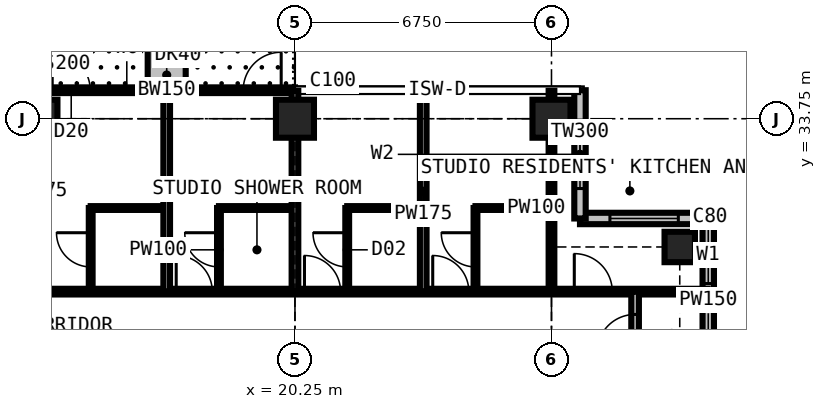
"""IFC4 building model, lengths in metres.
Left out: names, types, materials, properties, quantities, classifications, styles, units other than length and angle.
Written with IfcOpenShell. Run it as: python <this file> out.ifc"""

import sys

from ifc_helpers import new_model, si_unit, direction, frame, frame_2d, origin, origin_2d, place, context, subcontext, project, spatial, rectangle, extrude, element, fill, save


model = new_model("IFC4")
c1 = context("Model", 3, precision=1e-05, world=origin(), true_north=direction((0.0, 1.0)))
c2 = subcontext(c1, "Body", "Model", "MODEL_VIEW")
j1 = project(units=[si_unit("LENGTHUNIT", "METRE"), si_unit("PLANEANGLEUNIT", "RADIAN")], contexts=[c1])
p1 = place(None, origin())
s1 = spatial("IfcSite", under=j1, at=p1, CompositionType="ELEMENT")
p2 = place(p1, origin())
s2 = spatial("IfcBuilding", under=s1, at=p2, CompositionType="ELEMENT")
p3 = place(p2, frame((0.0, 0.0, 233.1)))
s3 = spatial("IfcBuildingStorey", under=s2, at=p3, CompositionType="ELEMENT", Elevation=233.1)
for number, where, z_axis, x_axis in (
    (1, (13.5, 33.75, 0.0), (0.0, 0.0, 1.0), (1.0, 0.0, 0.0)),
    (2, (20.25, 33.75, 0.0), (0.0, 0.0, 1.0), (1.0, 0.0, 0.0)),
    (3, (27.0, 33.75, 0.0), (0.0, 0.0, 1.0), (1.0, 0.0, 0.0)),
):
    element("IfcColumn", number, at=place(p3, frame(where, z_axis=z_axis, x_axis=x_axis)), inside=s3, PredefinedType="COLUMN", context=c2, shape_type="SweptSolid", body=[
        extrude(rectangle(XDim=1.0, YDim=1.0, at=origin_2d()), origin(), (0.0, 0.0, 1.0), 3.6),
    ])
p4 = place(p3, frame((30.375, 30.375, 0.0), z_axis=(0.0, 0.0, 1.0), x_axis=(1.0, 0.0, 0.0)))
e4 = element("IfcColumn", 4, at=p4, inside=s3, PredefinedType="COLUMN", context=c2, shape_type="SweptSolid", body=[
    extrude(rectangle(XDim=0.8, YDim=0.8, at=origin_2d()), origin(), (0.0, 0.0, 1.0), 3.6),
])
p5 = place(p3, frame((31.125, 27.75, 0.0), z_axis=(0.0, 0.0, 1.0), x_axis=(0.0, 1.0, 0.0)))
e5 = element("IfcWall", 5, at=p5, inside=s3, PredefinedType="SOLIDWALL", context=c2, shape_type="SweptSolid", body=[
    extrude(rectangle(XDim=3.375, YDim=0.3, at=frame_2d((1.688, 0.0))), origin(), (0.0, 0.0, 1.0), 3.375),
])
p6 = place(p5, frame((1.663, 0.0, 0.9)))
e6 = element("IfcOpeningElement", 6, at=p6, cuts=e5, PredefinedType="OPENING", context=c2, shape_type="SweptSolid", body=[
    extrude(rectangle(XDim=1.5, YDim=1.8, at=frame_2d((0.75, 0.9))), frame((0.0, 0.16, 0.0), z_axis=(0.0, -1.0, 0.0), x_axis=(1.0, 0.0, 0.0)), (0.0, 0.0, 1.0), 0.32),
])
p7 = place(p3, frame((31.125, 31.125, 0.0), z_axis=(0.0, 0.0, 1.0), x_axis=(-1.0, 0.0, 0.0)))
e7 = element("IfcWall", 7, at=p7, inside=s3, PredefinedType="SOLIDWALL", context=c2, shape_type="SweptSolid", body=[
    extrude(rectangle(XDim=3.375, YDim=0.3, at=frame_2d((1.688, 0.0))), origin(), (0.0, 0.0, 1.0), 3.375),
])
p8 = place(p7, frame((0.788, 0.0, 0.6)))
e8 = element("IfcOpeningElement", 8, at=p8, cuts=e7, PredefinedType="OPENING", context=c2, shape_type="SweptSolid", body=[
    extrude(rectangle(XDim=1.8, YDim=2.1, at=frame_2d((0.9, 1.05))), frame((0.0, 0.16, 0.0), z_axis=(0.0, -1.0, 0.0), x_axis=(1.0, 0.0, 0.0)), (0.0, 0.0, 1.0), 0.32),
])
p9 = place(p3, frame((27.75, 31.125, 0.0), z_axis=(0.0, 0.0, 1.0), x_axis=(0.0, 1.0, 0.0)))
e9 = element("IfcWall", 9, at=p9, inside=s3, PredefinedType="SOLIDWALL", context=c2, shape_type="SweptSolid", body=[
    extrude(rectangle(XDim=3.375, YDim=0.3, at=frame_2d((1.688, 0.0))), origin(), (0.0, 0.0, 1.0), 3.375),
])
p10 = place(p9, frame((0.788, 0.0, 0.6)))
e10 = element("IfcOpeningElement", 10, at=p10, cuts=e9, PredefinedType="OPENING", context=c2, shape_type="SweptSolid", body=[
    extrude(rectangle(XDim=1.8, YDim=2.1, at=frame_2d((0.9, 1.05))), frame((0.0, 0.16, 0.0), z_axis=(0.0, -1.0, 0.0), x_axis=(1.0, 0.0, 0.0)), (0.0, 0.0, 1.0), 0.32),
])
p11 = place(p3, frame((13.5, 34.5, 0.0), z_axis=(0.0, 0.0, 1.0), x_axis=(1.0, 0.0, 0.0)))
e11 = element("IfcWall", 11, at=p11, inside=s3, PredefinedType="SOLIDWALL", context=c2, shape_type="SweptSolid", body=[
    extrude(rectangle(XDim=6.75, YDim=0.15, at=frame_2d((3.375, 0.0))), origin(), (0.0, 0.0, 1.0), 3.375),
])
p12 = place(p11, frame((0.363, 0.0, 0.0)))
e12 = element("IfcOpeningElement", 12, at=p12, cuts=e11, PredefinedType="OPENING", context=c2, shape_type="SweptSolid", body=[
    extrude(rectangle(XDim=1.0, YDim=2.2, at=frame_2d((0.5, 1.1))), frame((0.0, 0.085, 0.0), z_axis=(0.0, -1.0, 0.0), x_axis=(1.0, 0.0, 0.0)), (0.0, 0.0, 1.0), 0.17),
])
p13 = place(p11, frame((1.725, 0.0, 0.9)))
e13 = element("IfcOpeningElement", 13, at=p13, cuts=e11, PredefinedType="OPENING", context=c2, shape_type="SweptSolid", body=[
    extrude(rectangle(XDim=1.2, YDim=1.8, at=frame_2d((0.6, 0.9))), frame((0.0, 0.085, 0.0), z_axis=(0.0, -1.0, 0.0), x_axis=(1.0, 0.0, 0.0)), (0.0, 0.0, 1.0), 0.17),
])
p14 = place(p11, frame((5.387, 0.0, 0.0)))
e14 = element("IfcOpeningElement", 14, at=p14, cuts=e11, PredefinedType="OPENING", context=c2, shape_type="SweptSolid", body=[
    extrude(rectangle(XDim=1.0, YDim=2.2, at=frame_2d((0.5, 1.1))), frame((0.0, 0.085, 0.0), z_axis=(0.0, -1.0, 0.0), x_axis=(1.0, 0.0, 0.0)), (0.0, 0.0, 1.0), 0.17),
])
p15 = place(p11, frame((3.825, 0.0, 0.9)))
e15 = element("IfcOpeningElement", 15, at=p15, cuts=e11, PredefinedType="OPENING", context=c2, shape_type="SweptSolid", body=[
    extrude(rectangle(XDim=1.2, YDim=1.8, at=frame_2d((0.6, 0.9))), frame((0.0, 0.085, 0.0), z_axis=(0.0, -1.0, 0.0), x_axis=(1.0, 0.0, 0.0)), (0.0, 0.0, 1.0), 0.17),
])
p16 = place(p3, frame((16.875, 34.6, 0.0), z_axis=(0.0, 0.0, 1.0), x_axis=(0.0, 1.0, 0.0)))
e16 = element("IfcWall", 16, at=p16, inside=s3, PredefinedType="USERDEFINED", context=c2, shape_type="SweptSolid", body=[
    extrude(rectangle(XDim=2.2, YDim=1.0, at=frame_2d((1.1, 0.0))), origin(), (0.0, 0.0, 1.0), 0.9),
])
p17 = place(p3, frame((11.3, 29.2, 0.0), z_axis=(0.0, 0.0, 1.0), x_axis=(1.0, 0.0, 0.0)))
e17 = element("IfcWall", 17, at=p17, inside=s3, PredefinedType="PARTITIONING", context=c2, shape_type="SweptSolid", body=[
    extrude(rectangle(XDim=19.809, YDim=0.15, at=frame_2d((9.904, 0.0))), origin(), (0.0, 0.0, 1.0), 3.375),
])
p18 = place(p17, frame((16.3, 0.0, 0.0)))
e18 = element("IfcOpeningElement", 18, at=p18, cuts=e17, PredefinedType="OPENING", context=c2, shape_type="SweptSolid", body=[
    extrude(rectangle(XDim=1.0, YDim=2.2, at=frame_2d((0.5, 1.1))), frame((0.0, 0.085, 0.0), z_axis=(0.0, -1.0, 0.0), x_axis=(1.0, 0.0, 0.0)), (0.0, 0.0, 1.0), 0.17),
])
p19 = place(p17, frame((5.825, 0.0, 0.0)))
e19 = element("IfcOpeningElement", 19, at=p19, cuts=e17, PredefinedType="OPENING", context=c2, shape_type="SweptSolid", body=[
    extrude(rectangle(XDim=0.95, YDim=2.2, at=frame_2d((0.475, 1.1))), frame((0.0, 0.085, 0.0), z_axis=(0.0, -1.0, 0.0), x_axis=(1.0, 0.0, 0.0)), (0.0, 0.0, 1.0), 0.17),
])
p20 = place(p17, frame((9.2, 0.0, 0.0)))
e20 = element("IfcOpeningElement", 20, at=p20, cuts=e17, PredefinedType="OPENING", context=c2, shape_type="SweptSolid", body=[
    extrude(rectangle(XDim=0.95, YDim=2.2, at=frame_2d((0.475, 1.1))), frame((0.0, 0.085, 0.0), z_axis=(0.0, -1.0, 0.0), x_axis=(1.0, 0.0, 0.0)), (0.0, 0.0, 1.0), 0.17),
])
p21 = place(p17, frame((12.575, 0.0, 0.0)))
e21 = element("IfcOpeningElement", 21, at=p21, cuts=e17, PredefinedType="OPENING", context=c2, shape_type="SweptSolid", body=[
    extrude(rectangle(XDim=0.95, YDim=2.2, at=frame_2d((0.475, 1.1))), frame((0.0, 0.085, 0.0), z_axis=(0.0, -1.0, 0.0), x_axis=(1.0, 0.0, 0.0)), (0.0, 0.0, 1.0), 0.17),
])
p22 = place(p17, frame((0.6, 0.0, 0.0)))
e22 = element("IfcOpeningElement", 22, at=p22, cuts=e17, PredefinedType="OPENING", context=c2, shape_type="SweptSolid", body=[
    extrude(rectangle(XDim=1.0, YDim=2.2, at=frame_2d((0.5, 1.1))), frame((0.0, 0.085, 0.0), z_axis=(0.0, -1.0, 0.0), x_axis=(1.0, 0.0, 0.0)), (0.0, 0.0, 1.0), 0.17),
])
p23 = place(p3, frame((14.875, 29.2, 0.0), z_axis=(0.0, 0.0, 1.0), x_axis=(0.0, 1.0, 0.0)))
e23 = element("IfcWall", 23, at=p23, inside=s3, PredefinedType="PARTITIONING", context=c2, shape_type="SweptSolid", body=[
    extrude(rectangle(XDim=2.2, YDim=0.1, at=frame_2d((1.1, 0.0))), origin(), (0.0, 0.0, 1.0), 3.375),
])
p24 = place(p23, frame((0.65, 0.0, 0.0)))
e24 = element("IfcOpeningElement", 24, at=p24, cuts=e23, PredefinedType="OPENING", context=c2, shape_type="SweptSolid", body=[
    extrude(rectangle(XDim=0.9, YDim=2.2, at=frame_2d((0.45, 1.1))), frame((0.0, 0.06, 0.0), z_axis=(0.0, -1.0, 0.0), x_axis=(1.0, 0.0, 0.0)), (0.0, 0.0, 1.0), 0.12),
])
p25 = place(p3, frame((14.875, 31.4, 0.0), z_axis=(0.0, 0.0, 1.0), x_axis=(1.0, 0.0, 0.0)))
e25 = element("IfcWall", 25, at=p25, inside=s3, PredefinedType="PARTITIONING", context=c2, shape_type="SweptSolid", body=[
    extrude(rectangle(XDim=2.0, YDim=0.1, at=frame_2d((1.0, 0.0))), origin(), (0.0, 0.0, 1.0), 3.375),
])
p26 = place(p3, frame((16.875, 29.2, 0.0), z_axis=(0.0, 0.0, 1.0), x_axis=(0.0, 1.0, 0.0)))
e26 = element("IfcWall", 26, at=p26, inside=s3, PredefinedType="PARTITIONING", context=c2, shape_type="SweptSolid", body=[
    extrude(rectangle(XDim=5.284, YDim=0.175, at=frame_2d((2.642, 0.0))), origin(), (0.0, 0.0, 1.0), 3.375),
])
p27 = place(p3, frame((18.25, 29.2, 0.0), z_axis=(0.0, 0.0, 1.0), x_axis=(0.0, 1.0, 0.0)))
e27 = element("IfcWall", 27, at=p27, inside=s3, PredefinedType="PARTITIONING", context=c2, shape_type="SweptSolid", body=[
    extrude(rectangle(XDim=2.2, YDim=0.1, at=frame_2d((1.1, 0.0))), origin(), (0.0, 0.0, 1.0), 3.375),
])
p28 = place(p27, frame((0.65, 0.0, 0.0)))
e28 = element("IfcOpeningElement", 28, at=p28, cuts=e27, PredefinedType="OPENING", context=c2, shape_type="SweptSolid", body=[
    extrude(rectangle(XDim=0.9, YDim=2.2, at=frame_2d((0.45, 1.1))), frame((0.0, 0.06, 0.0), z_axis=(0.0, -1.0, 0.0), x_axis=(1.0, 0.0, 0.0)), (0.0, 0.0, 1.0), 0.12),
])
p29 = place(p3, frame((18.25, 31.4, 0.0), z_axis=(0.0, 0.0, 1.0), x_axis=(1.0, 0.0, 0.0)))
e29 = element("IfcWall", 29, at=p29, inside=s3, PredefinedType="PARTITIONING", context=c2, shape_type="SweptSolid", body=[
    extrude(rectangle(XDim=2.0, YDim=0.1, at=frame_2d((1.0, 0.0))), origin(), (0.0, 0.0, 1.0), 3.375),
])
p30 = place(p3, frame((20.25, 29.2, 0.0), z_axis=(0.0, 0.0, 1.0), x_axis=(0.0, 1.0, 0.0)))
e30 = element("IfcWall", 30, at=p30, inside=s3, PredefinedType="PARTITIONING", context=c2, shape_type="SweptSolid", body=[
    extrude(rectangle(XDim=5.284, YDim=0.175, at=frame_2d((2.642, 0.0))), origin(), (0.0, 0.0, 1.0), 2.877),
])
p31 = place(p3, frame((21.625, 29.2, 0.0), z_axis=(0.0, 0.0, 1.0), x_axis=(0.0, 1.0, 0.0)))
e31 = element("IfcWall", 31, at=p31, inside=s3, PredefinedType="PARTITIONING", context=c2, shape_type="SweptSolid", body=[
    extrude(rectangle(XDim=2.2, YDim=0.1, at=frame_2d((1.1, 0.0))), origin(), (0.0, 0.0, 1.0), 3.375),
])
p32 = place(p31, frame((0.65, 0.0, 0.0)))
e32 = element("IfcOpeningElement", 32, at=p32, cuts=e31, PredefinedType="OPENING", context=c2, shape_type="SweptSolid", body=[
    extrude(rectangle(XDim=0.9, YDim=2.2, at=frame_2d((0.45, 1.1))), frame((0.0, 0.06, 0.0), z_axis=(0.0, -1.0, 0.0), x_axis=(1.0, 0.0, 0.0)), (0.0, 0.0, 1.0), 0.12),
])
p33 = place(p3, frame((21.625, 31.4, 0.0), z_axis=(0.0, 0.0, 1.0), x_axis=(1.0, 0.0, 0.0)))
e33 = element("IfcWall", 33, at=p33, inside=s3, PredefinedType="PARTITIONING", context=c2, shape_type="SweptSolid", body=[
    extrude(rectangle(XDim=2.0, YDim=0.1, at=frame_2d((1.0, 0.0))), origin(), (0.0, 0.0, 1.0), 3.375),
])
p34 = place(p3, frame((23.625, 29.2, 0.0), z_axis=(0.0, 0.0, 1.0), x_axis=(0.0, 1.0, 0.0)))
e34 = element("IfcWall", 34, at=p34, inside=s3, PredefinedType="PARTITIONING", context=c2, shape_type="SweptSolid", body=[
    extrude(rectangle(XDim=5.284, YDim=0.175, at=frame_2d((2.642, 0.0))), origin(), (0.0, 0.0, 1.0), 3.375),
])
p35 = place(p3, frame((25.0, 29.2, 0.0), z_axis=(0.0, 0.0, 1.0), x_axis=(0.0, 1.0, 0.0)))
e35 = element("IfcWall", 35, at=p35, inside=s3, PredefinedType="PARTITIONING", context=c2, shape_type="SweptSolid", body=[
    extrude(rectangle(XDim=2.2, YDim=0.1, at=frame_2d((1.1, 0.0))), origin(), (0.0, 0.0, 1.0), 3.375),
])
p36 = place(p35, frame((0.65, 0.0, 0.0)))
e36 = element("IfcOpeningElement", 36, at=p36, cuts=e35, PredefinedType="OPENING", context=c2, shape_type="SweptSolid", body=[
    extrude(rectangle(XDim=0.9, YDim=2.2, at=frame_2d((0.45, 1.1))), frame((0.0, 0.06, 0.0), z_axis=(0.0, -1.0, 0.0), x_axis=(1.0, 0.0, 0.0)), (0.0, 0.0, 1.0), 0.12),
])
p37 = place(p3, frame((25.0, 31.4, 0.0), z_axis=(0.0, 0.0, 1.0), x_axis=(1.0, 0.0, 0.0)))
e37 = element("IfcWall", 37, at=p37, inside=s3, PredefinedType="PARTITIONING", context=c2, shape_type="SweptSolid", body=[
    extrude(rectangle(XDim=2.0, YDim=0.1, at=frame_2d((1.0, 0.0))), origin(), (0.0, 0.0, 1.0), 3.375),
])
p38 = place(p3, frame((27.0, 29.2, 0.0), z_axis=(0.0, 0.0, 1.0), x_axis=(0.0, 1.0, 0.0)))
e38 = element("IfcWall", 38, at=p38, inside=s3, PredefinedType="PARTITIONING", context=c2, shape_type="SweptSolid", body=[
    extrude(rectangle(XDim=5.284, YDim=0.15, at=frame_2d((2.642, 0.0))), origin(), (0.0, 0.0, 1.0), 2.877),
])
p39 = place(p3, frame((29.2, 11.3, 0.0), z_axis=(0.0, 0.0, 1.0), x_axis=(0.0, 1.0, 0.0)))
e39 = element("IfcWall", 39, at=p39, inside=s3, PredefinedType="PARTITIONING", context=c2, shape_type="SweptSolid", body=[
    extrude(rectangle(XDim=17.9, YDim=0.2, at=frame_2d((8.95, 0.0))), origin(), (0.0, 0.0, 1.0), 3.375),
])
p40 = place(p39, frame((2.3, 0.0, 0.0)))
e40 = element("IfcOpeningElement", 40, at=p40, cuts=e39, PredefinedType="OPENING", context=c2, shape_type="SweptSolid", body=[
    extrude(rectangle(XDim=1.0, YDim=2.2, at=frame_2d((0.5, 1.1))), frame((0.0, 0.11, 0.0), z_axis=(0.0, -1.0, 0.0), x_axis=(1.0, 0.0, 0.0)), (0.0, 0.0, 1.0), 0.22),
])
p41 = place(p39, frame((5.775, 0.0, 0.0)))
e41 = element("IfcOpeningElement", 41, at=p41, cuts=e39, PredefinedType="OPENING", context=c2, shape_type="SweptSolid", body=[
    extrude(rectangle(XDim=0.95, YDim=2.2, at=frame_2d((0.475, 1.1))), frame((0.0, 0.11, 0.0), z_axis=(0.0, -1.0, 0.0), x_axis=(1.0, 0.0, 0.0)), (0.0, 0.0, 1.0), 0.22),
])
p42 = place(p39, frame((9.2, 0.0, 0.0)))
e42 = element("IfcOpeningElement", 42, at=p42, cuts=e39, PredefinedType="OPENING", context=c2, shape_type="SweptSolid", body=[
    extrude(rectangle(XDim=0.95, YDim=2.2, at=frame_2d((0.475, 1.1))), frame((0.0, 0.11, 0.0), z_axis=(0.0, -1.0, 0.0), x_axis=(1.0, 0.0, 0.0)), (0.0, 0.0, 1.0), 0.22),
])
p43 = place(p39, frame((12.575, 0.0, 0.0)))
e43 = element("IfcOpeningElement", 43, at=p43, cuts=e39, PredefinedType="OPENING", context=c2, shape_type="SweptSolid", body=[
    extrude(rectangle(XDim=0.95, YDim=2.2, at=frame_2d((0.475, 1.1))), frame((0.0, 0.11, 0.0), z_axis=(0.0, -1.0, 0.0), x_axis=(1.0, 0.0, 0.0)), (0.0, 0.0, 1.0), 0.22),
])
p44 = place(p39, frame((16.3, 0.0, 0.0)))
e44 = element("IfcOpeningElement", 44, at=p44, cuts=e39, PredefinedType="OPENING", context=c2, shape_type="SweptSolid", body=[
    extrude(rectangle(XDim=1.0, YDim=2.2, at=frame_2d((0.5, 1.1))), frame((0.0, 0.11, 0.0), z_axis=(0.0, -1.0, 0.0), x_axis=(1.0, 0.0, 0.0)), (0.0, 0.0, 1.0), 0.22),
])
p45 = place(p6, origin())
e45 = element("IfcWindow", 45, at=p45, inside=s3, PartitioningType="SINGLE_PANEL", PredefinedType="WINDOW", context=c2, shape_type="SweptSolid", body=[
    extrude(rectangle(XDim=1.5, YDim=1.8, at=frame_2d((0.75, 0.9))), frame((0.0, 0.03, 0.0), z_axis=(0.0, -1.0, 0.0), x_axis=(1.0, 0.0, 0.0)), (0.0, 0.0, 1.0), 0.06),
])
fill(e6, e45)
p46 = place(p8, origin())
e46 = element("IfcWindow", 46, at=p46, inside=s3, PartitioningType="SINGLE_PANEL", PredefinedType="WINDOW", context=c2, shape_type="SweptSolid", body=[
    extrude(rectangle(XDim=1.8, YDim=2.1, at=frame_2d((0.9, 1.05))), frame((0.0, 0.03, 0.0), z_axis=(0.0, -1.0, 0.0), x_axis=(1.0, 0.0, 0.0)), (0.0, 0.0, 1.0), 0.06),
])
fill(e8, e46)
p47 = place(p10, origin())
e47 = element("IfcWindow", 47, at=p47, inside=s3, PartitioningType="SINGLE_PANEL", PredefinedType="WINDOW", context=c2, shape_type="SweptSolid", body=[
    extrude(rectangle(XDim=1.8, YDim=2.1, at=frame_2d((0.9, 1.05))), frame((0.0, 0.03, 0.0), z_axis=(0.0, -1.0, 0.0), x_axis=(1.0, 0.0, 0.0)), (0.0, 0.0, 1.0), 0.06),
])
fill(e10, e47)
p48 = place(p12, origin())
e48 = element("IfcDoor", 48, at=p48, inside=s3, OperationType="SINGLE_SWING_LEFT", PredefinedType="DOOR", context=c2, shape_type="SweptSolid", body=[
    extrude(rectangle(XDim=1.0, YDim=2.2, at=frame_2d((0.5, 1.1))), frame((0.0, 0.025, 0.0), z_axis=(0.0, -1.0, 0.0), x_axis=(1.0, 0.0, 0.0)), (0.0, 0.0, 1.0), 0.05),
])
fill(e12, e48)
p49 = place(p13, origin())
e49 = element("IfcWindow", 49, at=p49, inside=s3, PartitioningType="SINGLE_PANEL", PredefinedType="WINDOW", context=c2, shape_type="SweptSolid", body=[
    extrude(rectangle(XDim=1.2, YDim=1.8, at=frame_2d((0.6, 0.9))), frame((0.0, 0.03, 0.0), z_axis=(0.0, -1.0, 0.0), x_axis=(1.0, 0.0, 0.0)), (0.0, 0.0, 1.0), 0.06),
])
fill(e13, e49)
p50 = place(p14, origin())
e50 = element("IfcDoor", 50, at=p50, inside=s3, OperationType="SINGLE_SWING_RIGHT", PredefinedType="DOOR", context=c2, shape_type="SweptSolid", body=[
    extrude(rectangle(XDim=1.0, YDim=2.2, at=frame_2d((0.5, 1.1))), frame((0.0, 0.025, 0.0), z_axis=(0.0, -1.0, 0.0), x_axis=(1.0, 0.0, 0.0)), (0.0, 0.0, 1.0), 0.05),
])
fill(e14, e50)
p51 = place(p15, origin())
e51 = element("IfcWindow", 51, at=p51, inside=s3, PartitioningType="SINGLE_PANEL", PredefinedType="WINDOW", context=c2, shape_type="SweptSolid", body=[
    extrude(rectangle(XDim=1.2, YDim=1.8, at=frame_2d((0.6, 0.9))), frame((0.0, 0.03, 0.0), z_axis=(0.0, -1.0, 0.0), x_axis=(1.0, 0.0, 0.0)), (0.0, 0.0, 1.0), 0.06),
])
fill(e15, e51)
p52 = place(p44, origin())
e52 = element("IfcDoor", 52, at=p52, inside=s3, OperationType="SINGLE_SWING_LEFT", PredefinedType="DOOR", context=c2, shape_type="SweptSolid", body=[
    extrude(rectangle(XDim=1.0, YDim=2.2, at=frame_2d((0.5, 1.1))), frame((0.0, 0.025, 0.0), z_axis=(0.0, -1.0, 0.0), x_axis=(1.0, 0.0, 0.0)), (0.0, 0.0, 1.0), 0.05),
])
fill(e44, e52)
p53 = place(p18, origin())
e53 = element("IfcDoor", 53, at=p53, inside=s3, OperationType="SINGLE_SWING_LEFT", PredefinedType="DOOR", context=c2, shape_type="SweptSolid", body=[
    extrude(rectangle(XDim=1.0, YDim=2.2, at=frame_2d((0.5, 1.1))), frame((0.0, 0.025, 0.0), z_axis=(0.0, -1.0, 0.0), x_axis=(1.0, 0.0, 0.0)), (0.0, 0.0, 1.0), 0.05),
])
fill(e18, e53)
p54 = place(p24, origin())
e54 = element("IfcDoor", 54, at=p54, inside=s3, OperationType="SINGLE_SWING_RIGHT", PredefinedType="DOOR", context=c2, shape_type="SweptSolid", body=[
    extrude(rectangle(XDim=0.9, YDim=2.2, at=frame_2d((0.45, 1.1))), frame((0.0, 0.025, 0.0), z_axis=(0.0, -1.0, 0.0), x_axis=(1.0, 0.0, 0.0)), (0.0, 0.0, 1.0), 0.05),
])
fill(e24, e54)
p55 = place(p19, origin())
e55 = element("IfcDoor", 55, at=p55, inside=s3, OperationType="SINGLE_SWING_LEFT", PredefinedType="DOOR", context=c2, shape_type="SweptSolid", body=[
    extrude(rectangle(XDim=0.95, YDim=2.2, at=frame_2d((0.475, 1.1))), frame((0.0, 0.025, 0.0), z_axis=(0.0, -1.0, 0.0), x_axis=(1.0, 0.0, 0.0)), (0.0, 0.0, 1.0), 0.05),
])
fill(e19, e55)
p56 = place(p28, origin())
e56 = element("IfcDoor", 56, at=p56, inside=s3, OperationType="SINGLE_SWING_RIGHT", PredefinedType="DOOR", context=c2, shape_type="SweptSolid", body=[
    extrude(rectangle(XDim=0.9, YDim=2.2, at=frame_2d((0.45, 1.1))), frame((0.0, 0.025, 0.0), z_axis=(0.0, -1.0, 0.0), x_axis=(1.0, 0.0, 0.0)), (0.0, 0.0, 1.0), 0.05),
])
fill(e28, e56)
p57 = place(p20, origin())
e57 = element("IfcDoor", 57, at=p57, inside=s3, OperationType="SINGLE_SWING_LEFT", PredefinedType="DOOR", context=c2, shape_type="SweptSolid", body=[
    extrude(rectangle(XDim=0.95, YDim=2.2, at=frame_2d((0.475, 1.1))), frame((0.0, 0.025, 0.0), z_axis=(0.0, -1.0, 0.0), x_axis=(1.0, 0.0, 0.0)), (0.0, 0.0, 1.0), 0.05),
])
fill(e20, e57)
p58 = place(p32, origin())
e58 = element("IfcDoor", 58, at=p58, inside=s3, OperationType="SINGLE_SWING_RIGHT", PredefinedType="DOOR", context=c2, shape_type="SweptSolid", body=[
    extrude(rectangle(XDim=0.9, YDim=2.2, at=frame_2d((0.45, 1.1))), frame((0.0, 0.025, 0.0), z_axis=(0.0, -1.0, 0.0), x_axis=(1.0, 0.0, 0.0)), (0.0, 0.0, 1.0), 0.05),
])
fill(e32, e58)
p59 = place(p21, origin())
e59 = element("IfcDoor", 59, at=p59, inside=s3, OperationType="SINGLE_SWING_LEFT", PredefinedType="DOOR", context=c2, shape_type="SweptSolid", body=[
    extrude(rectangle(XDim=0.95, YDim=2.2, at=frame_2d((0.475, 1.1))), frame((0.0, 0.025, 0.0), z_axis=(0.0, -1.0, 0.0), x_axis=(1.0, 0.0, 0.0)), (0.0, 0.0, 1.0), 0.05),
])
fill(e21, e59)
p60 = place(p36, origin())
e60 = element("IfcDoor", 60, at=p60, inside=s3, OperationType="SINGLE_SWING_RIGHT", PredefinedType="DOOR", context=c2, shape_type="SweptSolid", body=[
    extrude(rectangle(XDim=0.9, YDim=2.2, at=frame_2d((0.45, 1.1))), frame((0.0, 0.025, 0.0), z_axis=(0.0, -1.0, 0.0), x_axis=(1.0, 0.0, 0.0)), (0.0, 0.0, 1.0), 0.05),
])
fill(e36, e60)
save(model, sys.argv[1])
